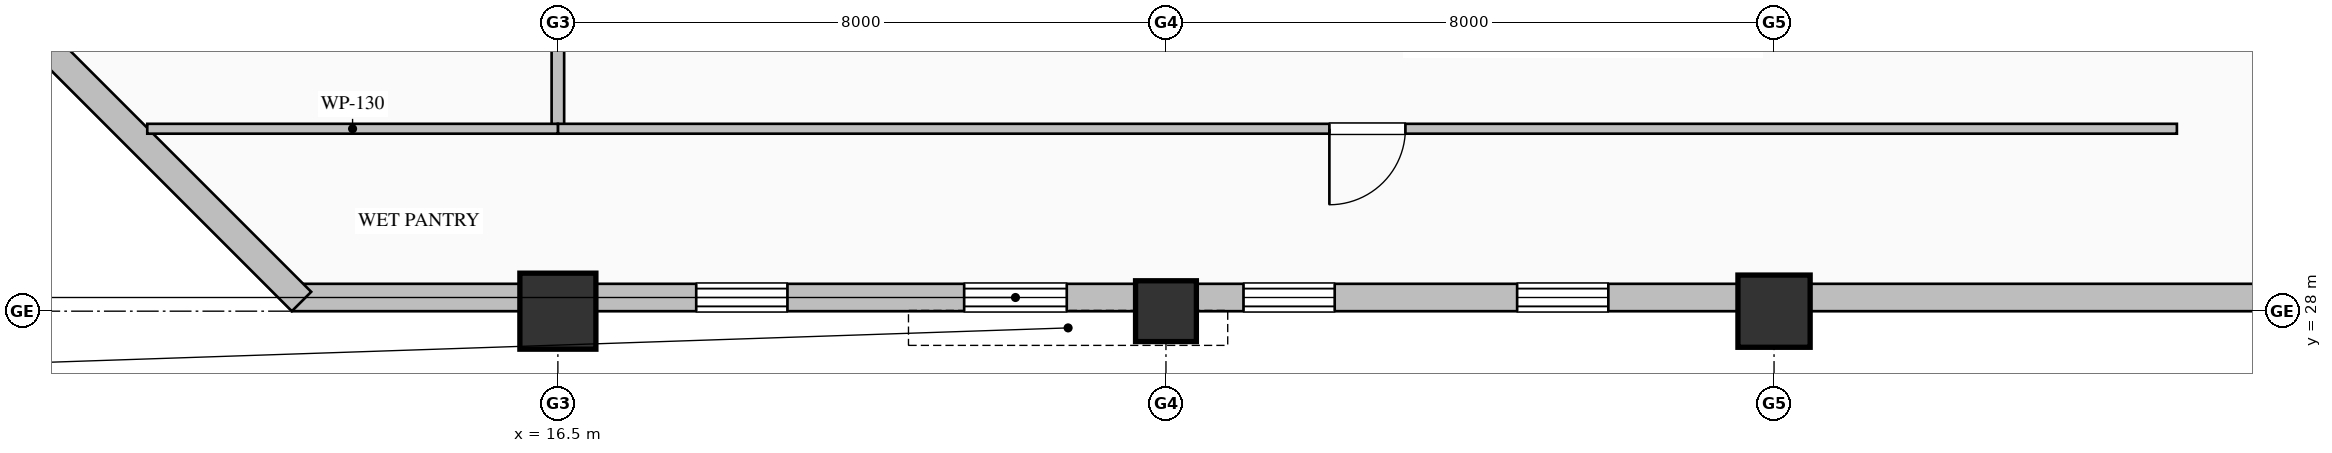
"""IFC4 building model, lengths in metres.
Left out: names, types, materials, properties, quantities, classifications, styles, units other than length and angle.
Written with IfcOpenShell. Run it as: python <this file> out.ifc"""

import sys

from ifc_helpers import new_model, si_unit, direction, frame, frame_2d, origin, origin_2d, place, context, subcontext, project, spatial, rectangle, hollow_rectangle, hollow_circle, extrude, element, fill, save


model = new_model("IFC4")
c1 = context("Model", 3, precision=1e-05, world=origin(), true_north=direction((0.0, 1.0)))
c2 = subcontext(c1, "Body", "Model", "MODEL_VIEW")
j1 = project(units=[si_unit("LENGTHUNIT", "METRE"), si_unit("PLANEANGLEUNIT", "RADIAN")], contexts=[c1])
p1 = place(None, origin())
s1 = spatial("IfcSite", under=j1, at=p1, CompositionType="ELEMENT")
p2 = place(p1, origin())
s2 = spatial("IfcBuilding", under=s1, at=p2, CompositionType="ELEMENT")
p3 = place(p2, frame((0.0, 0.0, 233.8)))
s3 = spatial("IfcBuildingStorey", under=s2, at=p3, CompositionType="ELEMENT", Elevation=233.8)
p4 = place(p3, frame((16.5, 28.0, 0.0), z_axis=(0.0, 0.0, 1.0), x_axis=(1.0, 0.0, 0.0)))
e1 = element("IfcColumn", 1, at=p4, inside=s3, PredefinedType="COLUMN", context=c2, shape_type="SweptSolid", body=[
    extrude(hollow_circle(Radius=0.5, WallThickness=0.036, at=origin_2d()), origin(), (0.0, 0.0, 1.0), 4.0),
])
p5 = place(p3, frame((24.5, 28.0, 0.0), z_axis=(0.0, 0.0, 1.0), x_axis=(1.0, 0.0, 0.0)))
e2 = element("IfcColumn", 2, at=p5, inside=s3, PredefinedType="COLUMN", context=c2, shape_type="SweptSolid", body=[
    extrude(hollow_rectangle(XDim=0.8, YDim=0.8, WallThickness=0.032, at=origin_2d()), origin(), (0.0, 0.0, 1.0), 4.0),
])
p6 = place(p3, frame((32.5, 28.0, 0.0), z_axis=(0.0, 0.0, 1.0), x_axis=(1.0, 0.0, 0.0)))
e3 = element("IfcColumn", 3, at=p6, inside=s3, PredefinedType="COLUMN", context=c2, shape_type="SweptSolid", body=[
    extrude(hollow_rectangle(XDim=0.95, YDim=0.95, WallThickness=0.036, at=origin_2d()), origin(), (0.0, 0.0, 1.0), 4.0),
])
p7 = place(p3, frame((40.52, 28.18, 0.0), z_axis=(0.0, 0.0, 1.0), x_axis=(-1.0, 0.0, 0.0)))
e4 = element("IfcWall", 4, at=p7, inside=s3, PredefinedType="SOLIDWALL", context=c2, shape_type="SweptSolid", body=[
    extrude(rectangle(XDim=27.52, YDim=0.36, at=frame_2d((13.76, 0.0))), origin(), (0.0, 0.0, 1.0), 3.187),
])
p8 = place(p7, frame((10.2, 0.0, 0.7)))
e5 = element("IfcOpeningElement", 5, at=p8, cuts=e4, PredefinedType="OPENING", context=c2, shape_type="SweptSolid", body=[
    extrude(rectangle(XDim=1.2, YDim=1.85, at=frame_2d((0.6, 0.925))), frame((0.0, 0.19, 0.0), z_axis=(0.0, -1.0, 0.0), x_axis=(1.0, 0.0, 0.0)), (0.0, 0.0, 1.0), 0.38),
])
p9 = place(p7, frame((13.8, 0.0, 0.9)))
e6 = element("IfcOpeningElement", 6, at=p9, cuts=e4, PredefinedType="OPENING", context=c2, shape_type="SweptSolid", body=[
    extrude(rectangle(XDim=1.2, YDim=1.85, at=frame_2d((0.6, 0.925))), frame((0.0, 0.19, 0.0), z_axis=(0.0, -1.0, 0.0), x_axis=(1.0, 0.0, 0.0)), (0.0, 0.0, 1.0), 0.38),
])
p10 = place(p7, frame((17.325, 0.0, 0.9)))
e7 = element("IfcOpeningElement", 7, at=p10, cuts=e4, PredefinedType="OPENING", context=c2, shape_type="SweptSolid", body=[
    extrude(rectangle(XDim=1.35, YDim=1.85, at=frame_2d((0.675, 0.925))), frame((0.0, 0.19, 0.0), z_axis=(0.0, -1.0, 0.0), x_axis=(1.0, 0.0, 0.0)), (0.0, 0.0, 1.0), 0.38),
])
p11 = place(p7, frame((21.0, 0.0, 0.7)))
e8 = element("IfcOpeningElement", 8, at=p11, cuts=e4, PredefinedType="OPENING", context=c2, shape_type="SweptSolid", body=[
    extrude(rectangle(XDim=1.2, YDim=1.85, at=frame_2d((0.6, 0.925))), frame((0.0, 0.19, 0.0), z_axis=(0.0, -1.0, 0.0), x_axis=(1.0, 0.0, 0.0)), (0.0, 0.0, 1.0), 0.38),
])
p12 = place(p3, frame((13.127, 28.127, 0.0), z_axis=(0.0, 0.0, 1.0), x_axis=(-0.707106781187, 0.707106781187, 0.0)))
e9 = element("IfcWall", 9, at=p12, inside=s3, PredefinedType="SOLIDWALL", context=c2, shape_type="SweptSolid", body=[
    extrude(rectangle(XDim=5.657, YDim=0.36, at=frame_2d((2.828, 0.0))), origin(), (0.0, 0.0, 1.0), 3.775),
])
p13 = place(p3, frame((16.5, 30.457, 0.0), z_axis=(0.0, 0.0, 1.0), x_axis=(0.0, 1.0, 0.0)))
e10 = element("IfcWall", 10, at=p13, inside=s3, PredefinedType="PARTITIONING", context=c2, shape_type="SweptSolid", body=[
    extrude(rectangle(XDim=2.068, YDim=0.165, at=frame_2d((1.034, 0.0))), origin(), (0.0, 0.0, 1.0), 3.179),
])
p14 = place(p3, frame((37.8, 30.4, 0.0), z_axis=(0.0, 0.0, 1.0), x_axis=(-1.0, 0.0, 0.0)))
e11 = element("IfcWall", 11, at=p14, inside=s3, PredefinedType="PARTITIONING", context=c2, shape_type="SweptSolid", body=[
    extrude(rectangle(XDim=21.3, YDim=0.13, at=frame_2d((10.65, 0.0))), origin(), (0.0, 0.0, 1.0), 3.775),
])
p15 = place(p14, frame((10.15, 0.0, 0.0)))
e12 = element("IfcOpeningElement", 12, at=p15, cuts=e11, PredefinedType="OPENING", context=c2, shape_type="SweptSolid", body=[
    extrude(rectangle(XDim=1.0, YDim=2.15, at=frame_2d((0.5, 1.075))), frame((0.0, 0.075, 0.0), z_axis=(0.0, -1.0, 0.0), x_axis=(1.0, 0.0, 0.0)), (0.0, 0.0, 1.0), 0.15),
])
p16 = place(p3, frame((16.5, 30.4, 0.0), z_axis=(0.0, 0.0, 1.0), x_axis=(-1.0, 0.0, 0.0)))
e13 = element("IfcWall", 13, at=p16, inside=s3, PredefinedType="PARTITIONING", context=c2, shape_type="SweptSolid", body=[
    extrude(rectangle(XDim=5.402, YDim=0.13, at=frame_2d((2.701, 0.0))), origin(), (0.0, 0.0, 1.0), 3.775),
])
p17 = place(p8, origin())
e14 = element("IfcWindow", 14, at=p17, inside=s3, PartitioningType="DOUBLE_PANEL_VERTICAL", PredefinedType="WINDOW", context=c2, shape_type="SweptSolid", body=[
    extrude(rectangle(XDim=1.2, YDim=1.85, at=frame_2d((0.6, 0.925))), frame((0.0, 0.15, 0.0), z_axis=(0.0, -1.0, 0.0), x_axis=(1.0, 0.0, 0.0)), (0.0, 0.0, 1.0), 0.06),
])
fill(e5, e14)
p18 = place(p9, origin())
e15 = element("IfcWindow", 15, at=p18, inside=s3, PartitioningType="DOUBLE_PANEL_VERTICAL", PredefinedType="WINDOW", context=c2, shape_type="SweptSolid", body=[
    extrude(rectangle(XDim=1.2, YDim=1.85, at=frame_2d((0.6, 0.925))), frame((0.0, 0.15, 0.0), z_axis=(0.0, -1.0, 0.0), x_axis=(1.0, 0.0, 0.0)), (0.0, 0.0, 1.0), 0.06),
])
fill(e6, e15)
p19 = place(p10, origin())
e16 = element("IfcWindow", 16, at=p19, inside=s3, PartitioningType="DOUBLE_PANEL_VERTICAL", PredefinedType="WINDOW", context=c2, shape_type="SweptSolid", body=[
    extrude(rectangle(XDim=1.35, YDim=1.85, at=frame_2d((0.675, 0.925))), frame((0.0, 0.15, 0.0), z_axis=(0.0, -1.0, 0.0), x_axis=(1.0, 0.0, 0.0)), (0.0, 0.0, 1.0), 0.06),
])
fill(e7, e16)
p20 = place(p11, origin())
e17 = element("IfcWindow", 17, at=p20, inside=s3, PartitioningType="DOUBLE_PANEL_VERTICAL", PredefinedType="WINDOW", context=c2, shape_type="SweptSolid", body=[
    extrude(rectangle(XDim=1.2, YDim=1.85, at=frame_2d((0.6, 0.925))), frame((0.0, 0.15, 0.0), z_axis=(0.0, -1.0, 0.0), x_axis=(1.0, 0.0, 0.0)), (0.0, 0.0, 1.0), 0.06),
])
fill(e8, e17)
p21 = place(p15, origin())
e18 = element("IfcDoor", 18, at=p21, inside=s3, OperationType="SINGLE_SWING_RIGHT", PredefinedType="DOOR", context=c2, shape_type="SweptSolid", body=[
    extrude(rectangle(XDim=1.0, YDim=2.15, at=frame_2d((0.5, 1.075))), frame((0.0, 0.025, 0.0), z_axis=(0.0, -1.0, 0.0), x_axis=(1.0, 0.0, 0.0)), (0.0, 0.0, 1.0), 0.05),
])
fill(e12, e18)
save(model, sys.argv[1])
